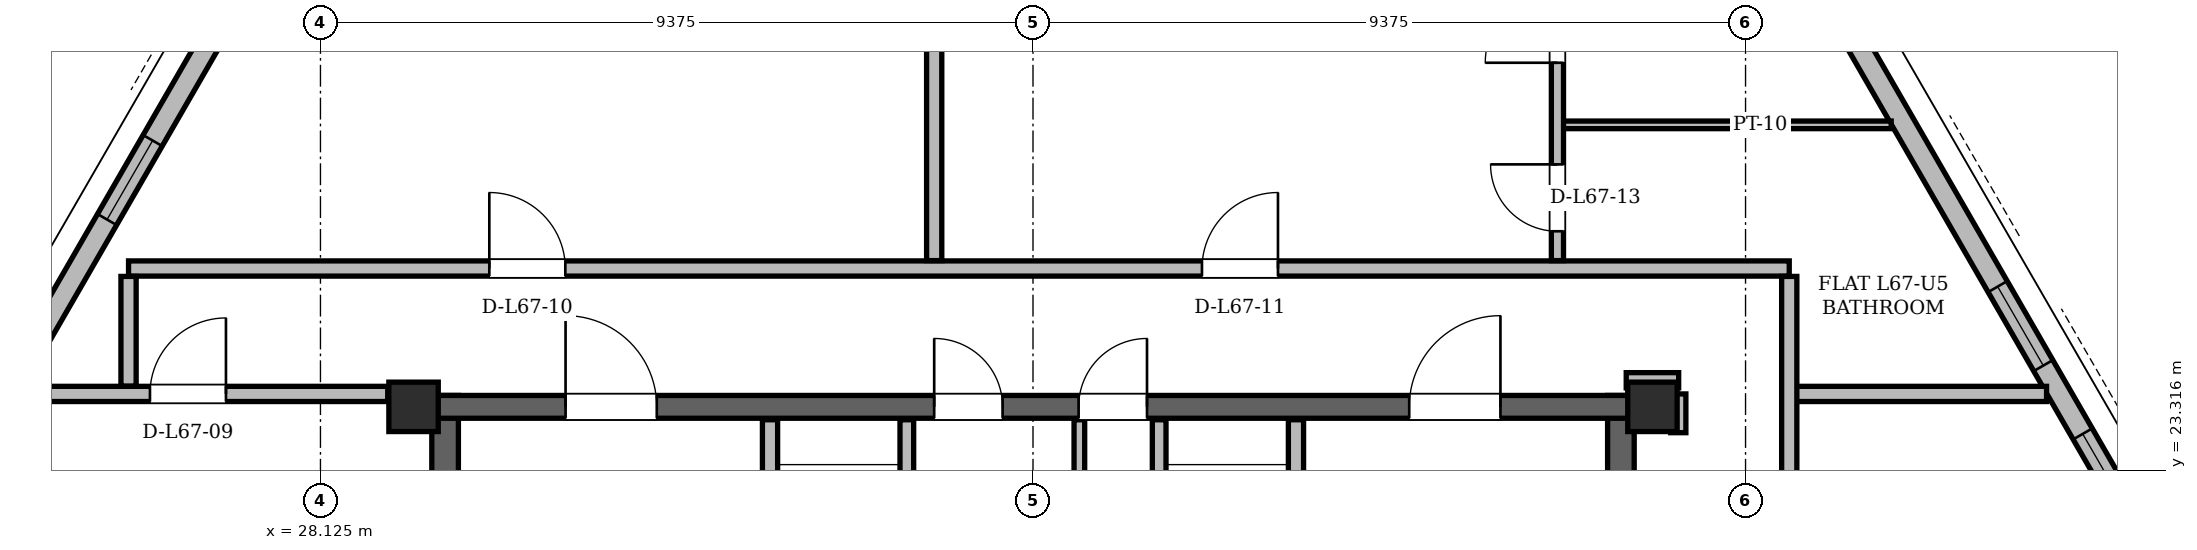
"""IFC4 building model, lengths in metres.
Left out: names, types, materials, properties, quantities, classifications, styles, units other than length and angle.
Written with IfcOpenShell. Run it as: python <this file> out.ifc"""

import sys

from ifc_helpers import new_model, si_unit, direction, frame, frame_2d, origin, origin_2d, place, context, subcontext, project, spatial, rectangle, hollow_rectangle, extrude, element, fill, save


model = new_model("IFC4")
c1 = context("Model", 3, precision=1e-05, world=origin(), true_north=direction((0.0, 1.0)))
c2 = subcontext(c1, "Body", "Model", "MODEL_VIEW")
j1 = project(units=[si_unit("LENGTHUNIT", "METRE"), si_unit("PLANEANGLEUNIT", "RADIAN")], contexts=[c1])
p1 = place(None, origin())
s1 = spatial("IfcSite", under=j1, at=p1, CompositionType="ELEMENT")
p2 = place(p1, origin())
s2 = spatial("IfcBuilding", under=s1, at=p2, CompositionType="ELEMENT")
p3 = place(p2, frame((0.0, 0.0, 253.8)))
s3 = spatial("IfcBuildingStorey", under=s2, at=p3, CompositionType="ELEMENT", Elevation=253.8)
for number, where, z_axis, x_axis in (
    (1, (45.65, 24.15, 0.0), (0.0, 0.0, 1.0), (1.0, 0.0, 0.0)),
    (2, (29.35, 24.15, 0.0), (0.0, 0.0, 1.0), (1.0, 0.0, 0.0)),
):
    element("IfcColumn", number, at=place(p3, frame(where, z_axis=z_axis, x_axis=x_axis)), inside=s3, PredefinedType="COLUMN", context=c2, shape_type="SweptSolid", body=[
        extrude(hollow_rectangle(XDim=0.65, YDim=0.65, WallThickness=0.05, at=origin_2d()), origin(), (0.0, 0.0, 1.0), 3.9),
    ])
for number, where, z_axis, x_axis in (
    (3, (29.765, 11.0, 0.0), (0.0, 0.0, 1.0), (0.0, 1.0, 0.0)),
    (4, (45.235, 11.0, 0.0), (0.0, 0.0, 1.0), (0.0, 1.0, 0.0)),
):
    element("IfcWall", number, at=place(p3, frame(where, z_axis=z_axis, x_axis=x_axis)), inside=s3, PredefinedType="SHEAR", context=c2, shape_type="SweptSolid", body=[
        extrude(rectangle(XDim=13.3, YDim=0.35, at=frame_2d((6.65, 0.0))), origin(), (0.0, 0.0, 1.0), 3.68),
    ])
p4 = place(p3, frame((29.65, 24.15, 0.0), z_axis=(0.0, 0.0, 1.0), x_axis=(1.0, 0.0, 0.0)))
e5 = element("IfcWall", 5, at=p4, inside=s3, PredefinedType="SHEAR", context=c2, shape_type="SweptSolid", body=[
    extrude(rectangle(XDim=15.7, YDim=0.3, at=frame_2d((7.85, 0.0))), origin(), (0.0, 0.0, 1.0), 3.68),
])
p5 = place(p4, frame((1.7, 0.0, 0.0)))
e6 = element("IfcOpeningElement", 6, at=p5, cuts=e5, PredefinedType="OPENING", context=c2, shape_type="SweptSolid", body=[
    extrude(rectangle(XDim=1.2, YDim=2.2, at=frame_2d((0.6, 1.1))), frame((0.0, 0.15, 0.0), z_axis=(0.0, -1.0, 0.0), x_axis=(1.0, 0.0, 0.0)), (0.0, 0.0, 1.0), 0.3),
])
p6 = place(p4, frame((12.8, 0.0, 0.0)))
e7 = element("IfcOpeningElement", 7, at=p6, cuts=e5, PredefinedType="OPENING", context=c2, shape_type="SweptSolid", body=[
    extrude(rectangle(XDim=1.2, YDim=2.2, at=frame_2d((0.6, 1.1))), frame((0.0, 0.15, 0.0), z_axis=(0.0, -1.0, 0.0), x_axis=(1.0, 0.0, 0.0)), (0.0, 0.0, 1.0), 0.3),
])
p7 = place(p4, frame((6.55, 0.0, 0.0)))
e8 = element("IfcOpeningElement", 8, at=p7, cuts=e5, PredefinedType="OPENING", context=c2, shape_type="SweptSolid", body=[
    extrude(rectangle(XDim=0.9, YDim=2.05, at=frame_2d((0.45, 1.025))), frame((0.0, 0.15, 0.0), z_axis=(0.0, -1.0, 0.0), x_axis=(1.0, 0.0, 0.0)), (0.0, 0.0, 1.0), 0.3),
])
p8 = place(p4, frame((8.45, 0.0, 0.0)))
e9 = element("IfcOpeningElement", 9, at=p8, cuts=e5, PredefinedType="OPENING", context=c2, shape_type="SweptSolid", body=[
    extrude(rectangle(XDim=0.9, YDim=2.05, at=frame_2d((0.45, 1.025))), frame((0.0, 0.15, 0.0), z_axis=(0.0, -1.0, 0.0), x_axis=(1.0, 0.0, 0.0)), (0.0, 0.0, 1.0), 0.3),
])
p9 = place(p3, frame((58.733, 10.938, 0.0), z_axis=(0.0, 0.0, 1.0), x_axis=(-0.500001745664, 0.866024395923, 0.0)))
e10 = element("IfcWall", 10, at=p9, inside=s3, PredefinedType="SOLIDWALL", context=c2, shape_type="SweptSolid", body=[
    extrude(rectangle(XDim=37.102, YDim=0.29, at=frame_2d((18.551, 0.0))), origin(), (0.0, 0.0, 1.0), 3.058),
])
p10 = place(p9, frame((8.034, 0.0, 0.0)))
e11 = element("IfcOpeningElement", 11, at=p10, cuts=e10, PredefinedType="OPENING", context=c2, shape_type="SweptSolid", body=[
    extrude(rectangle(XDim=1.5, YDim=2.2, at=frame_2d((0.75, 1.1))), frame((0.0, 0.145, 0.0), z_axis=(0.0, -1.0, 0.0), x_axis=(1.0, 0.0, 0.0)), (0.0, 0.0, 1.0), 0.29),
])
p11 = place(p9, frame((31.963, 0.0, 0.0)))
e12 = element("IfcOpeningElement", 12, at=p11, cuts=e10, PredefinedType="OPENING", context=c2, shape_type="SweptSolid", body=[
    extrude(rectangle(XDim=1.5, YDim=2.2, at=frame_2d((0.75, 1.1))), frame((0.0, 0.145, 0.0), z_axis=(0.0, -1.0, 0.0), x_axis=(1.0, 0.0, 0.0)), (0.0, 0.0, 1.0), 0.29),
])
p12 = place(p9, frame((12.245, 0.0, 0.85)))
e13 = element("IfcOpeningElement", 13, at=p12, cuts=e10, PredefinedType="OPENING", context=c2, shape_type="SweptSolid", body=[
    extrude(rectangle(XDim=2.6, YDim=1.95, at=frame_2d((1.3, 0.975))), frame((0.0, 0.145, 0.0), z_axis=(0.0, -1.0, 0.0), x_axis=(1.0, 0.0, 0.0)), (0.0, 0.0, 1.0), 0.29),
])
p13 = place(p9, frame((1.081, 0.0, 0.85)))
e14 = element("IfcOpeningElement", 14, at=p13, cuts=e10, PredefinedType="OPENING", context=c2, shape_type="SweptSolid", body=[
    extrude(rectangle(XDim=2.4, YDim=1.9, at=frame_2d((1.2, 0.95))), frame((0.0, 0.145, 0.0), z_axis=(0.0, -1.0, 0.0), x_axis=(1.0, 0.0, 0.0)), (0.0, 0.0, 1.0), 0.29),
])
p14 = place(p9, frame((28.842, 0.0, 0.85)))
e15 = element("IfcOpeningElement", 15, at=p14, cuts=e10, PredefinedType="OPENING", context=c2, shape_type="SweptSolid", body=[
    extrude(rectangle(XDim=1.2, YDim=1.48, at=frame_2d((0.6, 0.74))), frame((0.0, 0.145, 0.0), z_axis=(0.0, -1.0, 0.0), x_axis=(1.0, 0.0, 0.0)), (0.0, 0.0, 1.0), 0.29),
])
p15 = place(p9, frame((34.409, 0.0, 0.85)))
e16 = element("IfcOpeningElement", 16, at=p15, cuts=e10, PredefinedType="OPENING", context=c2, shape_type="SweptSolid", body=[
    extrude(rectangle(XDim=1.2, YDim=1.48, at=frame_2d((0.6, 0.74))), frame((0.0, 0.145, 0.0), z_axis=(0.0, -1.0, 0.0), x_axis=(1.0, 0.0, 0.0)), (0.0, 0.0, 1.0), 0.29),
])
p16 = place(p9, frame((15.882, 0.0, 0.85)))
e17 = element("IfcOpeningElement", 17, at=p16, cuts=e10, PredefinedType="OPENING", context=c2, shape_type="SweptSolid", body=[
    extrude(rectangle(XDim=1.2, YDim=1.48, at=frame_2d((0.6, 0.74))), frame((0.0, 0.145, 0.0), z_axis=(0.0, -1.0, 0.0), x_axis=(1.0, 0.0, 0.0)), (0.0, 0.0, 1.0), 0.29),
])
p17 = place(p9, frame((23.379, 0.0, 0.85)))
e18 = element("IfcOpeningElement", 18, at=p17, cuts=e10, PredefinedType="OPENING", context=c2, shape_type="SweptSolid", body=[
    extrude(rectangle(XDim=1.2, YDim=1.48, at=frame_2d((0.6, 0.74))), frame((0.0, 0.145, 0.0), z_axis=(0.0, -1.0, 0.0), x_axis=(1.0, 0.0, 0.0)), (0.0, 0.0, 1.0), 0.29),
])
p18 = place(p3, frame((34.818, 43.07, 0.0), z_axis=(0.0, 0.0, 1.0), x_axis=(-0.500001745664, -0.866024395923, 0.0)))
e19 = element("IfcWall", 19, at=p18, inside=s3, PredefinedType="SOLIDWALL", context=c2, shape_type="SweptSolid", body=[
    extrude(rectangle(XDim=37.102, YDim=0.29, at=frame_2d((18.551, 0.0))), origin(), (0.0, 0.0, 1.0), 3.058),
])
p19 = place(p18, frame((8.034, 0.0, 0.0)))
e20 = element("IfcOpeningElement", 20, at=p19, cuts=e19, PredefinedType="OPENING", context=c2, shape_type="SweptSolid", body=[
    extrude(rectangle(XDim=1.5, YDim=2.2, at=frame_2d((0.75, 1.1))), frame((0.0, 0.145, 0.0), z_axis=(0.0, -1.0, 0.0), x_axis=(1.0, 0.0, 0.0)), (0.0, 0.0, 1.0), 0.29),
])
p20 = place(p18, frame((28.813, 0.0, 0.0)))
e21 = element("IfcOpeningElement", 21, at=p20, cuts=e19, PredefinedType="OPENING", context=c2, shape_type="SweptSolid", body=[
    extrude(rectangle(XDim=1.5, YDim=2.2, at=frame_2d((0.75, 1.1))), frame((0.0, 0.145, 0.0), z_axis=(0.0, -1.0, 0.0), x_axis=(1.0, 0.0, 0.0)), (0.0, 0.0, 1.0), 0.29),
])
p21 = place(p18, frame((22.792, 0.0, 0.85)))
e22 = element("IfcOpeningElement", 22, at=p21, cuts=e19, PredefinedType="OPENING", context=c2, shape_type="SweptSolid", body=[
    extrude(rectangle(XDim=1.6, YDim=1.7, at=frame_2d((0.8, 0.85))), frame((0.0, 0.145, 0.0), z_axis=(0.0, -1.0, 0.0), x_axis=(1.0, 0.0, 0.0)), (0.0, 0.0, 1.0), 0.29),
])
p22 = place(p18, frame((34.406, 0.0, 0.85)))
e23 = element("IfcOpeningElement", 23, at=p22, cuts=e19, PredefinedType="OPENING", context=c2, shape_type="SweptSolid", body=[
    extrude(rectangle(XDim=1.4, YDim=1.6, at=frame_2d((0.7, 0.8))), frame((0.0, 0.145, 0.0), z_axis=(0.0, -1.0, 0.0), x_axis=(1.0, 0.0, 0.0)), (0.0, 0.0, 1.0), 0.29),
])
p23 = place(p18, frame((17.801, 0.0, 0.85)))
e24 = element("IfcOpeningElement", 24, at=p23, cuts=e19, PredefinedType="OPENING", context=c2, shape_type="SweptSolid", body=[
    extrude(rectangle(XDim=1.2, YDim=1.48, at=frame_2d((0.6, 0.74))), frame((0.0, 0.145, 0.0), z_axis=(0.0, -1.0, 0.0), x_axis=(1.0, 0.0, 0.0)), (0.0, 0.0, 1.0), 0.29),
])
p24 = place(p18, frame((1.293, 0.0, 0.85)))
e25 = element("IfcOpeningElement", 25, at=p24, cuts=e19, PredefinedType="OPENING", context=c2, shape_type="SweptSolid", body=[
    extrude(rectangle(XDim=1.6, YDim=1.7, at=frame_2d((0.8, 0.85))), frame((0.0, 0.145, 0.0), z_axis=(0.0, -1.0, 0.0), x_axis=(1.0, 0.0, 0.0)), (0.0, 0.0, 1.0), 0.29),
])
p25 = place(p3, frame((34.04, 19.48, 0.0), z_axis=(0.0, 0.0, 1.0), x_axis=(0.0, 1.0, 0.0)))
e26 = element("IfcWall", 26, at=p25, inside=s3, PredefinedType="PARTITIONING", context=c2, shape_type="SweptSolid", body=[
    extrude(rectangle(XDim=4.5, YDim=0.2, at=frame_2d((2.25, 0.0))), origin(), (0.0, 0.0, 1.0), 3.68),
])
p26 = place(p25, frame((2.12, 0.0, 0.0)))
e27 = element("IfcOpeningElement", 27, at=p26, cuts=e26, PredefinedType="OPENING", context=c2, shape_type="SweptSolid", body=[
    extrude(rectangle(XDim=1.1, YDim=2.2, at=frame_2d((0.55, 1.1))), frame((0.0, 0.1, 0.0), z_axis=(0.0, -1.0, 0.0), x_axis=(1.0, 0.0, 0.0)), (0.0, 0.0, 1.0), 0.2),
])
p27 = place(p3, frame((35.84, 20.96, 0.0), z_axis=(0.0, 0.0, 1.0), x_axis=(0.0, 1.0, 0.0)))
e28 = element("IfcWall", 28, at=p27, inside=s3, PredefinedType="PARTITIONING", context=c2, shape_type="SweptSolid", body=[
    extrude(rectangle(XDim=3.02, YDim=0.18, at=frame_2d((1.51, 0.0))), origin(), (0.0, 0.0, 1.0), 3.68),
])
p28 = place(p3, frame((40.96, 19.48, 0.0), z_axis=(0.0, 0.0, 1.0), x_axis=(0.0, 1.0, 0.0)))
e29 = element("IfcWall", 29, at=p28, inside=s3, PredefinedType="PARTITIONING", context=c2, shape_type="SweptSolid", body=[
    extrude(rectangle(XDim=4.5, YDim=0.2, at=frame_2d((2.25, 0.0))), origin(), (0.0, 0.0, 1.0), 3.68),
])
p29 = place(p28, frame((2.12, 0.0, 0.0)))
e30 = element("IfcOpeningElement", 30, at=p29, cuts=e29, PredefinedType="OPENING", context=c2, shape_type="SweptSolid", body=[
    extrude(rectangle(XDim=1.1, YDim=2.2, at=frame_2d((0.55, 1.1))), frame((0.0, 0.1, 0.0), z_axis=(0.0, -1.0, 0.0), x_axis=(1.0, 0.0, 0.0)), (0.0, 0.0, 1.0), 0.2),
])
p30 = place(p3, frame((39.16, 20.96, 0.0), z_axis=(0.0, 0.0, 1.0), x_axis=(0.0, 1.0, 0.0)))
e31 = element("IfcWall", 31, at=p30, inside=s3, PredefinedType="PARTITIONING", context=c2, shape_type="SweptSolid", body=[
    extrude(rectangle(XDim=3.02, YDim=0.18, at=frame_2d((1.51, 0.0))), origin(), (0.0, 0.0, 1.0), 3.68),
])
p31 = place(p3, frame((38.11, 21.06, 0.0), z_axis=(0.0, 0.0, 1.0), x_axis=(0.0, 1.0, 0.0)))
e32 = element("IfcWall", 32, at=p31, inside=s3, PredefinedType="PARTITIONING", context=c2, shape_type="SweptSolid", body=[
    extrude(rectangle(XDim=2.92, YDim=0.14, at=frame_2d((1.46, 0.0))), origin(), (0.0, 0.0, 1.0), 3.68),
])
p32 = place(p3, frame((24.165, 24.32, 0.0), z_axis=(0.0, 0.0, 1.0), x_axis=(1.0, 0.0, 0.0)))
e33 = element("IfcWall", 33, at=p32, inside=s3, PredefinedType="PARTITIONING", context=c2, shape_type="SweptSolid", body=[
    extrude(rectangle(XDim=4.845, YDim=0.2, at=frame_2d((2.423, 0.0))), origin(), (0.0, 0.0, 1.0), 3.68),
])
p33 = place(p32, frame((1.717, 0.0, 0.0)))
e34 = element("IfcOpeningElement", 34, at=p33, cuts=e33, PredefinedType="OPENING", context=c2, shape_type="SweptSolid", body=[
    extrude(rectangle(XDim=1.0, YDim=2.18, at=frame_2d((0.5, 1.09))), frame((0.0, 0.1, 0.0), z_axis=(0.0, -1.0, 0.0), x_axis=(1.0, 0.0, 0.0)), (0.0, 0.0, 1.0), 0.2),
])
p34 = place(p3, frame((47.45, 24.32, 0.0), z_axis=(0.0, 0.0, 1.0), x_axis=(1.0, 0.0, 0.0)))
e35 = element("IfcWall", 35, at=p34, inside=s3, PredefinedType="PARTITIONING", context=c2, shape_type="SweptSolid", body=[
    extrude(rectangle(XDim=3.385, YDim=0.2, at=frame_2d((1.693, 0.0))), origin(), (0.0, 0.0, 1.0), 3.68),
])
p35 = place(p3, frame((45.305, 24.5, 0.0), z_axis=(0.0, 0.0, 1.0), x_axis=(1.0, 0.0, 0.0)))
e36 = element("IfcWall", 36, at=p35, inside=s3, PredefinedType="PARTITIONING", context=c2, shape_type="SweptSolid", body=[
    extrude(rectangle(XDim=0.69, YDim=0.2, at=frame_2d((0.345, 0.0))), origin(), (0.0, 0.0, 1.0), 3.266),
])
p36 = place(p3, frame((25.6, 25.97, 0.0), z_axis=(0.0, 0.0, 1.0), x_axis=(1.0, 0.0, 0.0)))
e37 = element("IfcWall", 37, at=p36, inside=s3, PredefinedType="PARTITIONING", context=c2, shape_type="SweptSolid", body=[
    extrude(rectangle(XDim=21.85, YDim=0.2, at=frame_2d((10.925, 0.0))), origin(), (0.0, 0.0, 1.0), 3.266),
])
p37 = place(p36, frame((4.747, 0.0, 0.0)))
e38 = element("IfcOpeningElement", 38, at=p37, cuts=e37, PredefinedType="OPENING", context=c2, shape_type="SweptSolid", body=[
    extrude(rectangle(XDim=1.0, YDim=2.18, at=frame_2d((0.5, 1.09))), frame((0.0, 0.1, 0.0), z_axis=(0.0, -1.0, 0.0), x_axis=(1.0, 0.0, 0.0)), (0.0, 0.0, 1.0), 0.2),
])
p38 = place(p36, frame((14.123, 0.0, 0.0)))
e39 = element("IfcOpeningElement", 39, at=p38, cuts=e37, PredefinedType="OPENING", context=c2, shape_type="SweptSolid", body=[
    extrude(rectangle(XDim=1.0, YDim=2.18, at=frame_2d((0.5, 1.09))), frame((0.0, 0.1, 0.0), z_axis=(0.0, -1.0, 0.0), x_axis=(1.0, 0.0, 0.0)), (0.0, 0.0, 1.0), 0.2),
])
p39 = place(p3, frame((44.395, 27.86, 0.0), z_axis=(0.0, 0.0, 1.0), x_axis=(1.0, 0.0, 0.0)))
e40 = element("IfcWall", 40, at=p39, inside=s3, PredefinedType="PARTITIONING", context=c2, shape_type="SweptSolid", body=[
    extrude(rectangle(XDim=4.396, YDim=0.1, at=frame_2d((2.198, 0.0))), origin(), (0.0, 0.0, 1.0), 3.68),
])
p40 = place(p3, frame((25.6, 24.424, 0.0), z_axis=(0.0, 0.0, 1.0), x_axis=(0.0, 1.0, 0.0)))
e41 = element("IfcWall", 41, at=p40, inside=s3, PredefinedType="PARTITIONING", context=c2, shape_type="SweptSolid", body=[
    extrude(rectangle(XDim=1.442, YDim=0.2, at=frame_2d((0.721, 0.0))), origin(), (0.0, 0.0, 1.0), 3.68),
])
p41 = place(p3, frame((36.2, 26.074, 0.0), z_axis=(0.0, 0.0, 1.0), x_axis=(0.0, 1.0, 0.0)))
e42 = element("IfcWall", 42, at=p41, inside=s3, PredefinedType="PARTITIONING", context=c2, shape_type="SweptSolid", body=[
    extrude(rectangle(XDim=16.847, YDim=0.2, at=frame_2d((8.423, 0.0))), origin(), (0.0, 0.0, 1.0), 3.68),
])
p42 = place(p3, frame((44.4, 26.074, 0.0), z_axis=(0.0, 0.0, 1.0), x_axis=(0.0, 1.0, 0.0)))
e43 = element("IfcWall", 43, at=p42, inside=s3, PredefinedType="PARTITIONING", context=c2, shape_type="SweptSolid", body=[
    extrude(rectangle(XDim=9.392, YDim=0.16, at=frame_2d((4.696, 0.0))), origin(), (0.0, 0.0, 1.0), 3.058),
])
p43 = place(p42, frame((0.386, 0.0, 0.0)))
e44 = element("IfcOpeningElement", 44, at=p43, cuts=e43, PredefinedType="OPENING", context=c2, shape_type="SweptSolid", body=[
    extrude(rectangle(XDim=0.88, YDim=2.08, at=frame_2d((0.44, 1.04))), frame((0.0, 0.08, 0.0), z_axis=(0.0, -1.0, 0.0), x_axis=(1.0, 0.0, 0.0)), (0.0, 0.0, 1.0), 0.16),
])
p44 = place(p42, frame((2.603, 0.0, 0.0)))
e45 = element("IfcOpeningElement", 45, at=p44, cuts=e43, PredefinedType="OPENING", context=c2, shape_type="SweptSolid", body=[
    extrude(rectangle(XDim=0.95, YDim=2.1, at=frame_2d((0.475, 1.05))), frame((0.0, 0.08, 0.0), z_axis=(0.0, -1.0, 0.0), x_axis=(1.0, 0.0, 0.0)), (0.0, 0.0, 1.0), 0.16),
])
p45 = place(p42, frame((5.469, 0.0, 0.0)))
e46 = element("IfcOpeningElement", 46, at=p45, cuts=e43, PredefinedType="OPENING", context=c2, shape_type="SweptSolid", body=[
    extrude(rectangle(XDim=0.95, YDim=2.1, at=frame_2d((0.475, 1.05))), frame((0.0, 0.08, 0.0), z_axis=(0.0, -1.0, 0.0), x_axis=(1.0, 0.0, 0.0)), (0.0, 0.0, 1.0), 0.16),
])
p46 = place(p3, frame((45.99, 23.81, 0.0), z_axis=(0.0, 0.0, 1.0), x_axis=(0.0, 1.0, 0.0)))
e47 = element("IfcWall", 47, at=p46, inside=s3, PredefinedType="PARTITIONING", context=c2, shape_type="SweptSolid", body=[
    extrude(rectangle(XDim=0.51, YDim=0.2, at=frame_2d((0.255, 0.0))), origin(), (0.0, 0.0, 1.0), 3.68),
])
p47 = place(p3, frame((47.45, 9.404, 0.0), z_axis=(0.0, 0.0, 1.0), x_axis=(0.0, 1.0, 0.0)))
e48 = element("IfcWall", 48, at=p47, inside=s3, PredefinedType="PARTITIONING", context=c2, shape_type="SweptSolid", body=[
    extrude(rectangle(XDim=16.462, YDim=0.2, at=frame_2d((8.231, 0.0))), origin(), (0.0, 0.0, 1.0), 3.266),
])
p48 = place(p47, frame((9.32, 0.0, 0.0)))
e49 = element("IfcOpeningElement", 49, at=p48, cuts=e48, PredefinedType="OPENING", context=c2, shape_type="SweptSolid", body=[
    extrude(rectangle(XDim=1.0, YDim=2.18, at=frame_2d((0.5, 1.09))), frame((0.0, 0.1, 0.0), z_axis=(0.0, -1.0, 0.0), x_axis=(1.0, 0.0, 0.0)), (0.0, 0.0, 1.0), 0.2),
])
p49 = place(p12, origin())
e50 = element("IfcWindow", 50, at=p49, inside=s3, PartitioningType="SINGLE_PANEL", PredefinedType="WINDOW", context=c2, shape_type="SweptSolid", body=[
    extrude(rectangle(XDim=2.6, YDim=1.95, at=frame_2d((1.3, 0.975))), frame((0.0, 0.03, 0.0), z_axis=(0.0, -1.0, 0.0), x_axis=(1.0, 0.0, 0.0)), (0.0, 0.0, 1.0), 0.06),
])
fill(e13, e50)
p50 = place(p16, origin())
e51 = element("IfcWindow", 51, at=p50, inside=s3, PartitioningType="SINGLE_PANEL", PredefinedType="WINDOW", context=c2, shape_type="SweptSolid", body=[
    extrude(rectangle(XDim=1.2, YDim=1.48, at=frame_2d((0.6, 0.74))), frame((0.0, 0.03, 0.0), z_axis=(0.0, -1.0, 0.0), x_axis=(1.0, 0.0, 0.0)), (0.0, 0.0, 1.0), 0.06),
])
fill(e17, e51)
p51 = place(p23, origin())
e52 = element("IfcWindow", 52, at=p51, inside=s3, PartitioningType="SINGLE_PANEL", PredefinedType="WINDOW", context=c2, shape_type="SweptSolid", body=[
    extrude(rectangle(XDim=1.2, YDim=1.48, at=frame_2d((0.6, 0.74))), frame((0.0, 0.03, 0.0), z_axis=(0.0, -1.0, 0.0), x_axis=(1.0, 0.0, 0.0)), (0.0, 0.0, 1.0), 0.06),
])
fill(e24, e52)
p52 = place(p5, origin())
e53 = element("IfcDoor", 53, at=p52, inside=s3, OperationType="SINGLE_SWING_LEFT", PredefinedType="DOOR", context=c2, shape_type="SweptSolid", body=[
    extrude(rectangle(XDim=1.2, YDim=2.2, at=frame_2d((0.6, 1.1))), frame((0.0, 0.025, 0.0), z_axis=(0.0, -1.0, 0.0), x_axis=(1.0, 0.0, 0.0)), (0.0, 0.0, 1.0), 0.05),
])
fill(e6, e53)
p53 = place(p6, origin())
e54 = element("IfcDoor", 54, at=p53, inside=s3, OperationType="SINGLE_SWING_RIGHT", PredefinedType="DOOR", context=c2, shape_type="SweptSolid", body=[
    extrude(rectangle(XDim=1.2, YDim=2.2, at=frame_2d((0.6, 1.1))), frame((0.0, 0.025, 0.0), z_axis=(0.0, -1.0, 0.0), x_axis=(1.0, 0.0, 0.0)), (0.0, 0.0, 1.0), 0.05),
])
fill(e7, e54)
p54 = place(p7, origin())
e55 = element("IfcDoor", 55, at=p54, inside=s3, OperationType="SINGLE_SWING_LEFT", PredefinedType="DOOR", context=c2, shape_type="SweptSolid", body=[
    extrude(rectangle(XDim=0.9, YDim=2.05, at=frame_2d((0.45, 1.025))), frame((0.0, 0.025, 0.0), z_axis=(0.0, -1.0, 0.0), x_axis=(1.0, 0.0, 0.0)), (0.0, 0.0, 1.0), 0.05),
])
fill(e8, e55)
p55 = place(p8, origin())
e56 = element("IfcDoor", 56, at=p55, inside=s3, OperationType="SINGLE_SWING_RIGHT", PredefinedType="DOOR", context=c2, shape_type="SweptSolid", body=[
    extrude(rectangle(XDim=0.9, YDim=2.05, at=frame_2d((0.45, 1.025))), frame((0.0, 0.025, 0.0), z_axis=(0.0, -1.0, 0.0), x_axis=(1.0, 0.0, 0.0)), (0.0, 0.0, 1.0), 0.05),
])
fill(e9, e56)
p56 = place(p33, origin())
e57 = element("IfcDoor", 57, at=p56, inside=s3, OperationType="SINGLE_SWING_RIGHT", PredefinedType="DOOR", context=c2, shape_type="SweptSolid", body=[
    extrude(rectangle(XDim=1.0, YDim=2.18, at=frame_2d((0.5, 1.09))), frame((0.0, 0.025, 0.0), z_axis=(0.0, -1.0, 0.0), x_axis=(1.0, 0.0, 0.0)), (0.0, 0.0, 1.0), 0.05),
])
fill(e34, e57)
p57 = place(p37, origin())
e58 = element("IfcDoor", 58, at=p57, inside=s3, OperationType="SINGLE_SWING_LEFT", PredefinedType="DOOR", context=c2, shape_type="SweptSolid", body=[
    extrude(rectangle(XDim=1.0, YDim=2.18, at=frame_2d((0.5, 1.09))), frame((0.0, 0.025, 0.0), z_axis=(0.0, -1.0, 0.0), x_axis=(1.0, 0.0, 0.0)), (0.0, 0.0, 1.0), 0.05),
])
fill(e38, e58)
p58 = place(p38, origin())
e59 = element("IfcDoor", 59, at=p58, inside=s3, OperationType="SINGLE_SWING_RIGHT", PredefinedType="DOOR", context=c2, shape_type="SweptSolid", body=[
    extrude(rectangle(XDim=1.0, YDim=2.18, at=frame_2d((0.5, 1.09))), frame((0.0, 0.025, 0.0), z_axis=(0.0, -1.0, 0.0), x_axis=(1.0, 0.0, 0.0)), (0.0, 0.0, 1.0), 0.05),
])
fill(e39, e59)
p59 = place(p43, origin())
e60 = element("IfcDoor", 60, at=p59, inside=s3, OperationType="SINGLE_SWING_RIGHT", PredefinedType="DOOR", context=c2, shape_type="SweptSolid", body=[
    extrude(rectangle(XDim=0.88, YDim=2.08, at=frame_2d((0.44, 1.04))), frame((0.0, 0.025, 0.0), z_axis=(0.0, -1.0, 0.0), x_axis=(1.0, 0.0, 0.0)), (0.0, 0.0, 1.0), 0.05),
])
fill(e44, e60)
p60 = place(p44, origin())
e61 = element("IfcDoor", 61, at=p60, inside=s3, OperationType="SINGLE_SWING_LEFT", PredefinedType="DOOR", context=c2, shape_type="SweptSolid", body=[
    extrude(rectangle(XDim=0.95, YDim=2.1, at=frame_2d((0.475, 1.05))), frame((0.0, 0.025, 0.0), z_axis=(0.0, -1.0, 0.0), x_axis=(1.0, 0.0, 0.0)), (0.0, 0.0, 1.0), 0.05),
])
fill(e45, e61)
save(model, sys.argv[1])
